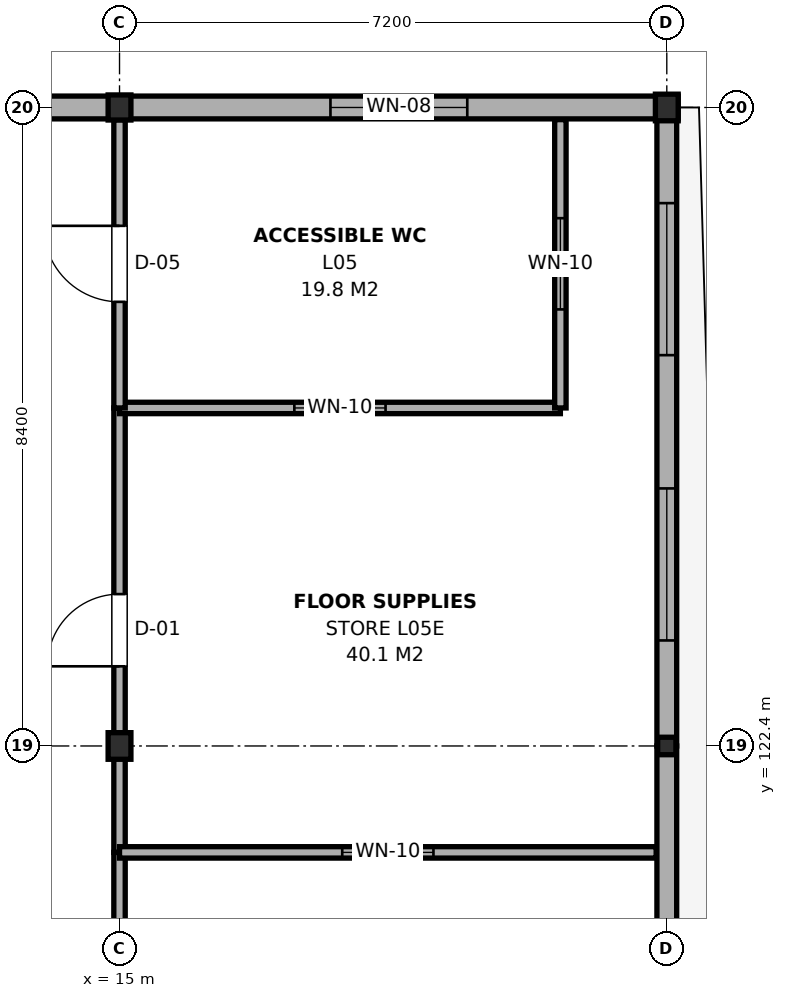
"""IFC4 building model, lengths in metres.
Left out: names, types, materials, properties, quantities, classifications, styles, units other than length and angle.
Written with IfcOpenShell. Run it as: python <this file> out.ifc"""

import sys

from ifc_helpers import new_model, si_unit, direction, frame, frame_2d, origin, origin_2d, place, context, subcontext, project, spatial, rectangle, i_section, extrude, element, fill, save


model = new_model("IFC4")
c1 = context("Model", 3, precision=1e-05, world=origin(), true_north=direction((0.0, 1.0)))
c2 = subcontext(c1, "Body", "Model", "MODEL_VIEW")
j1 = project(units=[si_unit("LENGTHUNIT", "METRE"), si_unit("PLANEANGLEUNIT", "RADIAN")], contexts=[c1])
p1 = place(None, origin())
s1 = spatial("IfcSite", under=j1, at=p1, CompositionType="ELEMENT")
p2 = place(p1, origin())
s2 = spatial("IfcBuilding", under=s1, at=p2, CompositionType="ELEMENT")
p3 = place(p2, frame((0.0, 0.0, 21.0)))
s3 = spatial("IfcBuildingStorey", under=s2, at=p3, CompositionType="ELEMENT", Elevation=21.0)
p4 = place(p3, frame((15.0, 122.4, 0.0), z_axis=(0.0, 0.0, 1.0), x_axis=(1.0, 0.0, 0.0)))
e1 = element("IfcColumn", 1, at=p4, inside=s3, PredefinedType="COLUMN", context=c2, shape_type="SweptSolid", body=[
    extrude(i_section(OverallWidth=0.3, OverallDepth=0.35, WebThickness=0.01, FlangeThickness=0.018, FilletRadius=0.027, at=origin_2d()), origin(), (0.0, 0.0, 1.0), 3.7),
])
p5 = place(p3, frame((15.0, 130.8, 0.0), z_axis=(0.0, 0.0, 1.0), x_axis=(1.0, 0.0, 0.0)))
e2 = element("IfcColumn", 2, at=p5, inside=s3, PredefinedType="COLUMN", context=c2, shape_type="SweptSolid", body=[
    extrude(i_section(OverallWidth=0.3, OverallDepth=0.33, WebThickness=0.01, FlangeThickness=0.017, FilletRadius=0.027, at=origin_2d()), origin(), (0.0, 0.0, 1.0), 3.7),
])
p6 = place(p3, frame((22.2, 122.4, 0.0), z_axis=(0.0, 0.0, 1.0), x_axis=(1.0, 0.0, 0.0)))
e3 = element("IfcColumn", 3, at=p6, inside=s3, PredefinedType="COLUMN", context=c2, shape_type="SweptSolid", body=[
    extrude(i_section(OverallWidth=0.24, OverallDepth=0.23, WebThickness=0.008, FlangeThickness=0.012, FilletRadius=0.021, at=origin_2d()), origin(), (0.0, 0.0, 1.0), 3.7),
])
p7 = place(p3, frame((22.2, 130.8, 0.0), z_axis=(0.0, 0.0, 1.0), x_axis=(1.0, 0.0, 0.0)))
e4 = element("IfcColumn", 4, at=p7, inside=s3, PredefinedType="COLUMN", context=c2, shape_type="SweptSolid", body=[
    extrude(i_section(OverallWidth=0.3, OverallDepth=0.35, WebThickness=0.01, FlangeThickness=0.018, FilletRadius=0.027, at=origin_2d()), origin(), (0.0, 0.0, 1.0), 3.7),
])
p8 = place(p3, frame((22.2, 113.4, 0.0), z_axis=(0.0, 0.0, 1.0), x_axis=(0.0, 1.0, 0.0)))
e5 = element("IfcWall", 5, at=p8, inside=s3, PredefinedType="SOLIDWALL", context=c2, shape_type="SweptSolid", body=[
    extrude(rectangle(XDim=9.0, YDim=0.26, at=frame_2d((4.5, 0.0))), origin(), (0.0, 0.0, 1.0), 3.105),
])
p9 = place(p8, frame((1.52, 0.0, 0.65)))
e6 = element("IfcOpeningElement", 6, at=p9, cuts=e5, PredefinedType="OPENING", context=c2, shape_type="SweptSolid", body=[
    extrude(rectangle(XDim=2.0, YDim=1.8, at=frame_2d((1.0, 0.9))), frame((0.0, 0.145, 0.0), z_axis=(0.0, -1.0, 0.0), x_axis=(1.0, 0.0, 0.0)), (0.0, 0.0, 1.0), 0.29),
])
p10 = place(p8, frame((4.53, 0.0, 0.65)))
e7 = element("IfcOpeningElement", 7, at=p10, cuts=e5, PredefinedType="OPENING", context=c2, shape_type="SweptSolid", body=[
    extrude(rectangle(XDim=2.0, YDim=1.8, at=frame_2d((1.0, 0.9))), frame((0.0, 0.145, 0.0), z_axis=(0.0, -1.0, 0.0), x_axis=(1.0, 0.0, 0.0)), (0.0, 0.0, 1.0), 0.29),
])
p11 = place(p3, frame((22.2, 122.4, 0.0), z_axis=(0.0, 0.0, 1.0), x_axis=(0.0, 1.0, 0.0)))
e8 = element("IfcWall", 8, at=p11, inside=s3, PredefinedType="SOLIDWALL", context=c2, shape_type="SweptSolid", body=[
    extrude(rectangle(XDim=8.53, YDim=0.26, at=frame_2d((4.265, 0.0))), origin(), (0.0, 0.0, 1.0), 3.155),
])
p12 = place(p11, frame((1.388, 0.0, 0.65)))
e9 = element("IfcOpeningElement", 9, at=p12, cuts=e8, PredefinedType="OPENING", context=c2, shape_type="SweptSolid", body=[
    extrude(rectangle(XDim=2.0, YDim=1.8, at=frame_2d((1.0, 0.9))), frame((0.0, 0.145, 0.0), z_axis=(0.0, -1.0, 0.0), x_axis=(1.0, 0.0, 0.0)), (0.0, 0.0, 1.0), 0.29),
])
p13 = place(p11, frame((5.142, 0.0, 0.65)))
e10 = element("IfcOpeningElement", 10, at=p13, cuts=e8, PredefinedType="OPENING", context=c2, shape_type="SweptSolid", body=[
    extrude(rectangle(XDim=2.0, YDim=1.8, at=frame_2d((1.0, 0.9))), frame((0.0, 0.145, 0.0), z_axis=(0.0, -1.0, 0.0), x_axis=(1.0, 0.0, 0.0)), (0.0, 0.0, 1.0), 0.29),
])
p14 = place(p3, frame((7.8, 130.8, 0.0), z_axis=(0.0, 0.0, 1.0), x_axis=(1.0, 0.0, 0.0)))
e11 = element("IfcWall", 11, at=p14, inside=s3, PredefinedType="SOLIDWALL", context=c2, shape_type="SweptSolid", body=[
    extrude(rectangle(XDim=7.2, YDim=0.3, at=frame_2d((3.6, 0.0))), origin(), (0.0, 0.0, 1.0), 3.095),
])
p15 = place(p14, frame((2.7, 0.0, 0.65)))
e12 = element("IfcOpeningElement", 12, at=p15, cuts=e11, PredefinedType="OPENING", context=c2, shape_type="SweptSolid", body=[
    extrude(rectangle(XDim=1.8, YDim=1.2, at=frame_2d((0.9, 0.6))), frame((0.0, 0.165, 0.0), z_axis=(0.0, -1.0, 0.0), x_axis=(1.0, 0.0, 0.0)), (0.0, 0.0, 1.0), 0.33),
])
p16 = place(p3, frame((15.0, 130.8, 0.0), z_axis=(0.0, 0.0, 1.0), x_axis=(1.0, 0.0, 0.0)))
e13 = element("IfcWall", 13, at=p16, inside=s3, PredefinedType="SOLIDWALL", context=c2, shape_type="SweptSolid", body=[
    extrude(rectangle(XDim=7.35, YDim=0.3, at=frame_2d((3.675, 0.0))), origin(), (0.0, 0.0, 1.0), 3.145),
])
p17 = place(p16, frame((2.775, 0.0, 0.65)))
e14 = element("IfcOpeningElement", 14, at=p17, cuts=e13, PredefinedType="OPENING", context=c2, shape_type="SweptSolid", body=[
    extrude(rectangle(XDim=1.8, YDim=1.2, at=frame_2d((0.9, 0.6))), frame((0.0, 0.165, 0.0), z_axis=(0.0, -1.0, 0.0), x_axis=(1.0, 0.0, 0.0)), (0.0, 0.0, 1.0), 0.33),
])
p18 = place(p3, frame((15.0, 104.4, 0.0), z_axis=(0.0, 0.0, 1.0), x_axis=(0.0, 1.0, 0.0)))
e15 = element("IfcWall", 15, at=p18, inside=s3, PredefinedType="PARTITIONING", context=c2, shape_type="SweptSolid", body=[
    extrude(rectangle(XDim=16.6, YDim=0.15, at=frame_2d((8.3, 0.0))), origin(), (0.0, 0.0, 1.0), 3.095),
])
p19 = place(p18, frame((7.05, 0.0, 0.0)))
e16 = element("IfcOpeningElement", 16, at=p19, cuts=e15, PredefinedType="OPENING", context=c2, shape_type="SweptSolid", body=[
    extrude(rectangle(XDim=1.6, YDim=2.15, at=frame_2d((0.8, 1.075))), frame((0.0, 0.09, 0.0), z_axis=(0.0, -1.0, 0.0), x_axis=(1.0, 0.0, 0.0)), (0.0, 0.0, 1.0), 0.18),
])
p20 = place(p18, frame((2.85, 0.0, 0.95)))
e17 = element("IfcOpeningElement", 17, at=p20, cuts=e15, PredefinedType="OPENING", context=c2, shape_type="SweptSolid", body=[
    extrude(rectangle(XDim=2.6, YDim=1.5, at=frame_2d((1.3, 0.75))), frame((0.0, 0.09, 0.0), z_axis=(0.0, -1.0, 0.0), x_axis=(1.0, 0.0, 0.0)), (0.0, 0.0, 1.0), 0.18),
])
p21 = place(p18, frame((11.15, 0.0, 0.95)))
e18 = element("IfcOpeningElement", 18, at=p21, cuts=e15, PredefinedType="OPENING", context=c2, shape_type="SweptSolid", body=[
    extrude(rectangle(XDim=2.6, YDim=1.5, at=frame_2d((1.3, 0.75))), frame((0.0, 0.09, 0.0), z_axis=(0.0, -1.0, 0.0), x_axis=(1.0, 0.0, 0.0)), (0.0, 0.0, 1.0), 0.18),
])
p22 = place(p3, frame((15.0, 121.0, 0.0), z_axis=(0.0, 0.0, 1.0), x_axis=(0.0, 1.0, 0.0)))
e19 = element("IfcWall", 19, at=p22, inside=s3, PredefinedType="PARTITIONING", context=c2, shape_type="SweptSolid", body=[
    extrude(rectangle(XDim=5.847, YDim=0.15, at=frame_2d((2.923, 0.0))), origin(), (0.0, 0.0, 1.0), 3.095),
])
p23 = place(p22, frame((2.448, 0.0, 0.0)))
e20 = element("IfcOpeningElement", 20, at=p23, cuts=e19, PredefinedType="OPENING", context=c2, shape_type="SweptSolid", body=[
    extrude(rectangle(XDim=0.95, YDim=2.15, at=frame_2d((0.475, 1.075))), frame((0.0, 0.09, 0.0), z_axis=(0.0, -1.0, 0.0), x_axis=(1.0, 0.0, 0.0)), (0.0, 0.0, 1.0), 0.18),
])
p24 = place(p3, frame((15.0, 126.847, 0.0), z_axis=(0.0, 0.0, 1.0), x_axis=(1.0, 0.0, 0.0)))
e21 = element("IfcWall", 21, at=p24, inside=s3, PredefinedType="PARTITIONING", context=c2, shape_type="SweptSolid", body=[
    extrude(rectangle(XDim=5.8, YDim=0.15, at=frame_2d((2.9, 0.0))), origin(), (0.0, 0.0, 1.0), 3.305),
])
p25 = place(p24, frame((2.3, 0.0, 0.95)))
e22 = element("IfcOpeningElement", 22, at=p25, cuts=e21, PredefinedType="OPENING", context=c2, shape_type="SweptSolid", body=[
    extrude(rectangle(XDim=1.2, YDim=1.5, at=frame_2d((0.6, 0.75))), frame((0.0, 0.09, 0.0), z_axis=(0.0, -1.0, 0.0), x_axis=(1.0, 0.0, 0.0)), (0.0, 0.0, 1.0), 0.18),
])
p26 = place(p3, frame((20.8, 126.847, 0.0), z_axis=(0.0, 0.0, 1.0), x_axis=(0.0, 1.0, 0.0)))
e23 = element("IfcWall", 23, at=p26, inside=s3, PredefinedType="PARTITIONING", context=c2, shape_type="SweptSolid", body=[
    extrude(rectangle(XDim=3.793, YDim=0.15, at=frame_2d((1.896, 0.0))), origin(), (0.0, 0.0, 1.0), 3.195),
])
p27 = place(p26, frame((1.296, 0.0, 0.95)))
e24 = element("IfcOpeningElement", 24, at=p27, cuts=e23, PredefinedType="OPENING", context=c2, shape_type="SweptSolid", body=[
    extrude(rectangle(XDim=1.2, YDim=1.5, at=frame_2d((0.6, 0.75))), frame((0.0, 0.09, 0.0), z_axis=(0.0, -1.0, 0.0), x_axis=(1.0, 0.0, 0.0)), (0.0, 0.0, 1.0), 0.18),
])
p28 = place(p3, frame((15.0, 126.847, 0.0), z_axis=(0.0, 0.0, 1.0), x_axis=(0.0, 1.0, 0.0)))
e25 = element("IfcWall", 25, at=p28, inside=s3, PredefinedType="PARTITIONING", context=c2, shape_type="SweptSolid", body=[
    extrude(rectangle(XDim=3.793, YDim=0.15, at=frame_2d((1.896, 0.0))), origin(), (0.0, 0.0, 1.0), 3.145),
])
p29 = place(p28, frame((1.396, 0.0, 0.0)))
e26 = element("IfcOpeningElement", 26, at=p29, cuts=e25, PredefinedType="OPENING", context=c2, shape_type="SweptSolid", body=[
    extrude(rectangle(XDim=1.0, YDim=2.15, at=frame_2d((0.5, 1.075))), frame((0.0, 0.09, 0.0), z_axis=(0.0, -1.0, 0.0), x_axis=(1.0, 0.0, 0.0)), (0.0, 0.0, 1.0), 0.18),
])
p30 = place(p3, frame((15.0, 121.0, 0.0), z_axis=(0.0, 0.0, 1.0), x_axis=(1.0, 0.0, 0.0)))
e27 = element("IfcWall", 27, at=p30, inside=s3, PredefinedType="PARTITIONING", context=c2, shape_type="SweptSolid", body=[
    extrude(rectangle(XDim=7.06, YDim=0.15, at=frame_2d((3.53, 0.0))), origin(), (0.0, 0.0, 1.0), 3.155),
])
p31 = place(p30, frame((2.93, 0.0, 0.95)))
e28 = element("IfcOpeningElement", 28, at=p31, cuts=e27, PredefinedType="OPENING", context=c2, shape_type="SweptSolid", body=[
    extrude(rectangle(XDim=1.2, YDim=1.5, at=frame_2d((0.6, 0.75))), frame((0.0, 0.09, 0.0), z_axis=(0.0, -1.0, 0.0), x_axis=(1.0, 0.0, 0.0)), (0.0, 0.0, 1.0), 0.18),
])
p32 = place(p12, origin())
e29 = element("IfcWindow", 29, at=p32, inside=s3, PartitioningType="SINGLE_PANEL", PredefinedType="WINDOW", context=c2, shape_type="SweptSolid", body=[
    extrude(rectangle(XDim=2.0, YDim=1.8, at=frame_2d((1.0, 0.9))), frame((0.0, 0.03, 0.0), z_axis=(0.0, -1.0, 0.0), x_axis=(1.0, 0.0, 0.0)), (0.0, 0.0, 1.0), 0.06),
])
fill(e9, e29)
p33 = place(p13, origin())
e30 = element("IfcWindow", 30, at=p33, inside=s3, PartitioningType="SINGLE_PANEL", PredefinedType="WINDOW", context=c2, shape_type="SweptSolid", body=[
    extrude(rectangle(XDim=2.0, YDim=1.8, at=frame_2d((1.0, 0.9))), frame((0.0, 0.03, 0.0), z_axis=(0.0, -1.0, 0.0), x_axis=(1.0, 0.0, 0.0)), (0.0, 0.0, 1.0), 0.06),
])
fill(e10, e30)
p34 = place(p17, origin())
e31 = element("IfcWindow", 31, at=p34, inside=s3, PartitioningType="SINGLE_PANEL", PredefinedType="WINDOW", context=c2, shape_type="SweptSolid", body=[
    extrude(rectangle(XDim=1.8, YDim=1.2, at=frame_2d((0.9, 0.6))), frame((0.0, 0.03, 0.0), z_axis=(0.0, -1.0, 0.0), x_axis=(1.0, 0.0, 0.0)), (0.0, 0.0, 1.0), 0.06),
])
fill(e14, e31)
p35 = place(p23, origin())
e32 = element("IfcDoor", 32, at=p35, inside=s3, OperationType="SINGLE_SWING_LEFT", PredefinedType="DOOR", context=c2, shape_type="SweptSolid", body=[
    extrude(rectangle(XDim=0.95, YDim=2.15, at=frame_2d((0.475, 1.075))), frame((0.0, 0.025, 0.0), z_axis=(0.0, -1.0, 0.0), x_axis=(1.0, 0.0, 0.0)), (0.0, 0.0, 1.0), 0.05),
])
fill(e20, e32)
p36 = place(p25, origin())
e33 = element("IfcWindow", 33, at=p36, inside=s3, PartitioningType="SINGLE_PANEL", PredefinedType="WINDOW", context=c2, shape_type="SweptSolid", body=[
    extrude(rectangle(XDim=1.2, YDim=1.5, at=frame_2d((0.6, 0.75))), frame((0.0, 0.03, 0.0), z_axis=(0.0, -1.0, 0.0), x_axis=(1.0, 0.0, 0.0)), (0.0, 0.0, 1.0), 0.06),
])
fill(e22, e33)
p37 = place(p27, origin())
e34 = element("IfcWindow", 34, at=p37, inside=s3, PartitioningType="SINGLE_PANEL", PredefinedType="WINDOW", context=c2, shape_type="SweptSolid", body=[
    extrude(rectangle(XDim=1.2, YDim=1.5, at=frame_2d((0.6, 0.75))), frame((0.0, 0.03, 0.0), z_axis=(0.0, -1.0, 0.0), x_axis=(1.0, 0.0, 0.0)), (0.0, 0.0, 1.0), 0.06),
])
fill(e24, e34)
p38 = place(p29, origin())
e35 = element("IfcDoor", 35, at=p38, inside=s3, OperationType="SINGLE_SWING_RIGHT", PredefinedType="DOOR", context=c2, shape_type="SweptSolid", body=[
    extrude(rectangle(XDim=1.0, YDim=2.15, at=frame_2d((0.5, 1.075))), frame((0.0, 0.025, 0.0), z_axis=(0.0, -1.0, 0.0), x_axis=(1.0, 0.0, 0.0)), (0.0, 0.0, 1.0), 0.05),
])
fill(e26, e35)
p39 = place(p31, origin())
e36 = element("IfcWindow", 36, at=p39, inside=s3, PartitioningType="SINGLE_PANEL", PredefinedType="WINDOW", context=c2, shape_type="SweptSolid", body=[
    extrude(rectangle(XDim=1.2, YDim=1.5, at=frame_2d((0.6, 0.75))), frame((0.0, 0.03, 0.0), z_axis=(0.0, -1.0, 0.0), x_axis=(1.0, 0.0, 0.0)), (0.0, 0.0, 1.0), 0.06),
])
fill(e28, e36)
save(model, sys.argv[1])
